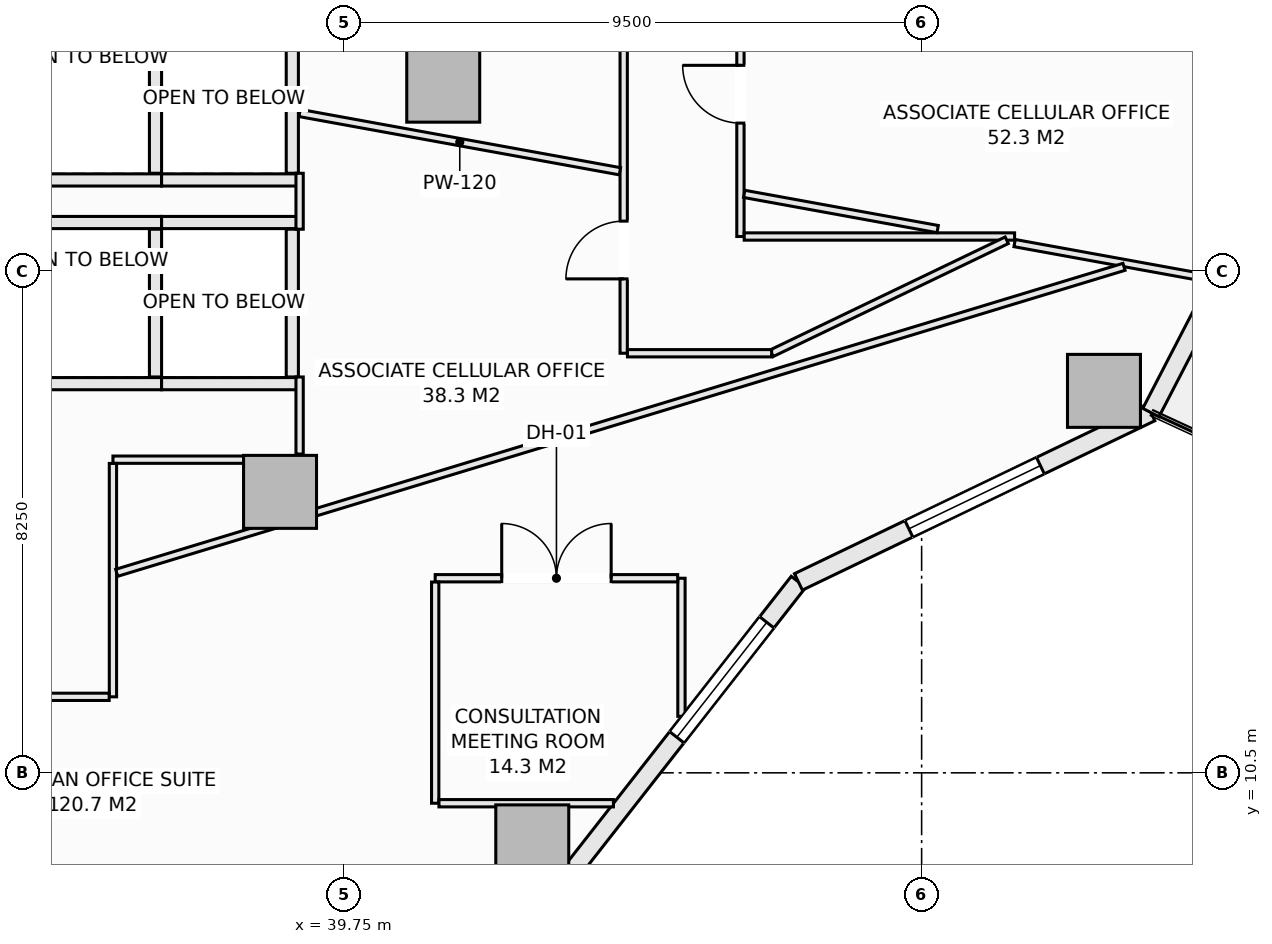
"""IFC4 building model, lengths in metres.
Left out: names, types, materials, properties, quantities, classifications, styles, units other than length and angle.
Written with IfcOpenShell. Run it as: python <this file> out.ifc"""

import sys

from ifc_helpers import new_model, si_unit, direction, frame, frame_2d, origin, origin_2d, place, context, subcontext, project, spatial, rectangle, extrude, element, fill, save


model = new_model("IFC4")
c1 = context("Model", 3, precision=1e-05, world=origin(), true_north=direction((0.0, 1.0)))
c2 = subcontext(c1, "Body", "Model", "MODEL_VIEW")
j1 = project(units=[si_unit("LENGTHUNIT", "METRE"), si_unit("PLANEANGLEUNIT", "RADIAN")], contexts=[c1])
p1 = place(None, origin())
s1 = spatial("IfcSite", under=j1, at=p1, CompositionType="ELEMENT")
p2 = place(p1, origin())
s2 = spatial("IfcBuilding", under=s1, at=p2, CompositionType="ELEMENT")
p3 = place(p2, frame((0.0, 0.0, 65.0)))
s3 = spatial("IfcBuildingStorey", under=s2, at=p3, CompositionType="ELEMENT", Elevation=65.0)
for number, where, z_axis, x_axis in (
    (1, (42.846, 9.373, -0.28), (0.0, 0.0, 1.0), (1.0, 0.0, 0.0)),
    (2, (52.249, 16.781, -0.28), (0.0, 0.0, 1.0), (1.0, 0.0, 0.0)),
    (3, (38.698, 15.121, -0.28), (0.0, 0.0, 1.0), (1.0, 0.0, 0.0)),
    (4, (41.382, 21.801, -0.28), (0.0, 0.0, 1.0), (1.0, 0.0, 0.0)),
):
    element("IfcColumn", number, at=place(p3, frame(where, z_axis=z_axis, x_axis=x_axis)), inside=s3, PredefinedType="COLUMN", context=c2, shape_type="SweptSolid", body=[
        extrude(rectangle(XDim=1.2, YDim=1.2, at=origin_2d()), origin(), (0.0, 0.0, 1.0), 3.85),
    ])
p4 = place(p3, frame((43.344, 8.684, 0.0), z_axis=(0.0, 0.0, 1.0), x_axis=(0.616434798832, 0.78740595552, 0.0)))
e5 = element("IfcWall", 5, at=p4, inside=s3, PredefinedType="SOLIDWALL", context=c2, shape_type="SweptSolid", body=[
    extrude(rectangle(XDim=6.294, YDim=0.3, at=frame_2d((3.147, 0.0))), origin(), (0.0, 0.0, 1.0), 3.093),
])
p5 = place(p4, frame((3.05, 0.0, 0.85)))
e6 = element("IfcOpeningElement", 6, at=p5, cuts=e5, PredefinedType="OPENING", context=c2, shape_type="SweptSolid", body=[
    extrude(rectangle(XDim=2.4, YDim=1.9, at=frame_2d((1.2, 0.95))), frame((0.0, 0.16, 0.0), z_axis=(0.0, -1.0, 0.0), x_axis=(1.0, 0.0, 0.0)), (0.0, 0.0, 1.0), 0.32),
])
p6 = place(p3, frame((47.224, 13.64, 0.0), z_axis=(0.0, 0.0, 1.0), x_axis=(0.901354747727, 0.433081538224, 0.0)))
e7 = element("IfcWall", 7, at=p6, inside=s3, PredefinedType="SOLIDWALL", context=c2, shape_type="SweptSolid", body=[
    extrude(rectangle(XDim=6.431, YDim=0.3, at=frame_2d((3.215, 0.0))), origin(), (0.0, 0.0, 1.0), 3.093),
])
p7 = place(p6, frame((2.015, 0.0, 0.85)))
e8 = element("IfcOpeningElement", 8, at=p7, cuts=e7, PredefinedType="OPENING", context=c2, shape_type="SweptSolid", body=[
    extrude(rectangle(XDim=2.4, YDim=1.9, at=frame_2d((1.2, 0.95))), frame((0.0, 0.16, 0.0), z_axis=(0.0, -1.0, 0.0), x_axis=(1.0, 0.0, 0.0)), (0.0, 0.0, 1.0), 0.32),
])
p8 = place(p3, frame((53.021, 16.425, 0.0), z_axis=(0.0, 0.0, 1.0), x_axis=(0.459800981414, 0.888021991558, 0.0)))
e9 = element("IfcWall", 9, at=p8, inside=s3, PredefinedType="SOLIDWALL", context=c2, shape_type="SweptSolid", body=[
    extrude(rectangle(XDim=5.744, YDim=0.3, at=frame_2d((2.872, 0.0))), origin(), (0.0, 0.0, 1.0), 3.093),
])
p9 = place(p8, frame((2.85, 0.0, 0.85)))
e10 = element("IfcOpeningElement", 10, at=p9, cuts=e9, PredefinedType="OPENING", context=c2, shape_type="SweptSolid", body=[
    extrude(rectangle(XDim=2.4, YDim=1.9, at=frame_2d((1.2, 0.95))), frame((0.0, 0.16, 0.0), z_axis=(0.0, -1.0, 0.0), x_axis=(1.0, 0.0, 0.0)), (0.0, 0.0, 1.0), 0.32),
])
for number, where, z_axis, x_axis in (
    (11, (34.5, 19.55, 0.0), (0.0, 0.0, 1.0), (1.0, 0.0, 0.0)),
    (12, (34.5, 16.9, 0.0), (0.0, 0.0, 1.0), (1.0, 0.0, 0.0)),
):
    element("IfcWall", number, at=place(p3, frame(where, z_axis=z_axis, x_axis=x_axis)), inside=s3, PredefinedType="SOLIDWALL", context=c2, shape_type="SweptSolid", body=[
        extrude(rectangle(XDim=2.25, YDim=0.2, at=frame_2d((1.125, 0.0))), origin(), (0.0, 0.0, 1.0), 3.57),
    ])
p10 = place(p3, frame((36.65, 17.01, 0.0), z_axis=(0.0, 0.0, 1.0), x_axis=(0.0, 1.0, 0.0)))
e13 = element("IfcWall", 13, at=p10, inside=s3, PredefinedType="SOLIDWALL", context=c2, shape_type="SweptSolid", body=[
    extrude(rectangle(XDim=2.43, YDim=0.2, at=frame_2d((1.215, 0.0))), origin(), (0.0, 0.0, 1.0), 3.57),
])
for number, where, z_axis, x_axis in (
    (14, (36.75, 19.55, 0.0), (0.0, 0.0, 1.0), (1.0, 0.0, 0.0)),
    (15, (36.75, 16.9, 0.0), (0.0, 0.0, 1.0), (1.0, 0.0, 0.0)),
):
    element("IfcWall", number, at=place(p3, frame(where, z_axis=z_axis, x_axis=x_axis)), inside=s3, PredefinedType="SOLIDWALL", context=c2, shape_type="SweptSolid", body=[
        extrude(rectangle(XDim=2.25, YDim=0.2, at=frame_2d((1.125, 0.0))), origin(), (0.0, 0.0, 1.0), 3.57),
    ])
p11 = place(p3, frame((38.9, 17.01, 0.0), z_axis=(0.0, 0.0, 1.0), x_axis=(0.0, 1.0, 0.0)))
e16 = element("IfcWall", 16, at=p11, inside=s3, PredefinedType="SOLIDWALL", context=c2, shape_type="SweptSolid", body=[
    extrude(rectangle(XDim=2.43, YDim=0.2, at=frame_2d((1.215, 0.0))), origin(), (0.0, 0.0, 1.0), 3.57),
])
p12 = place(p3, frame((34.5, 20.25, 0.0), z_axis=(0.0, 0.0, 1.0), x_axis=(1.0, 0.0, 0.0)))
e17 = element("IfcWall", 17, at=p12, inside=s3, PredefinedType="SOLIDWALL", context=c2, shape_type="SweptSolid", body=[
    extrude(rectangle(XDim=2.25, YDim=0.2, at=frame_2d((1.125, 0.0))), origin(), (0.0, 0.0, 1.0), 3.57),
])
p13 = place(p3, frame((36.65, 20.36, 0.0), z_axis=(0.0, 0.0, 1.0), x_axis=(0.0, 1.0, 0.0)))
e18 = element("IfcWall", 18, at=p13, inside=s3, PredefinedType="SOLIDWALL", context=c2, shape_type="SweptSolid", body=[
    extrude(rectangle(XDim=2.43, YDim=0.2, at=frame_2d((1.215, 0.0))), origin(), (0.0, 0.0, 1.0), 3.57),
])
p14 = place(p3, frame((36.75, 20.25, 0.0), z_axis=(0.0, 0.0, 1.0), x_axis=(1.0, 0.0, 0.0)))
e19 = element("IfcWall", 19, at=p14, inside=s3, PredefinedType="SOLIDWALL", context=c2, shape_type="SweptSolid", body=[
    extrude(rectangle(XDim=2.25, YDim=0.2, at=frame_2d((1.125, 0.0))), origin(), (0.0, 0.0, 1.0), 3.57),
])
p15 = place(p3, frame((38.9, 20.36, 0.0), z_axis=(0.0, 0.0, 1.0), x_axis=(0.0, 1.0, 0.0)))
e20 = element("IfcWall", 20, at=p15, inside=s3, PredefinedType="SOLIDWALL", context=c2, shape_type="SweptSolid", body=[
    extrude(rectangle(XDim=2.43, YDim=0.2, at=frame_2d((1.215, 0.0))), origin(), (0.0, 0.0, 1.0), 3.57),
])
p16 = place(p3, frame((35.95, 15.65, 0.0), z_axis=(0.0, 0.0, 1.0), x_axis=(1.0, 0.0, 0.0)))
e21 = element("IfcWall", 21, at=p16, inside=s3, PredefinedType="PARTITIONING", context=c2, shape_type="SweptSolid", body=[
    extrude(rectangle(XDim=2.291, YDim=0.12, at=frame_2d((1.146, 0.0))), origin(), (0.0, 0.0, 1.0), 3.57),
])
p17 = place(p3, frame((35.95, 11.75, 0.0), z_axis=(0.0, 0.0, 1.0), x_axis=(0.0, 1.0, 0.0)))
e22 = element("IfcWall", 22, at=p17, inside=s3, PredefinedType="PARTITIONING", context=c2, shape_type="SweptSolid", body=[
    extrude(rectangle(XDim=3.838, YDim=0.12, at=frame_2d((1.919, 0.0))), origin(), (0.0, 0.0, 1.0), 3.57),
])
p18 = place(p3, frame((27.242, 11.75, 0.0), z_axis=(0.0, 0.0, 1.0), x_axis=(1.0, 0.0, 0.0)))
e23 = element("IfcWall", 23, at=p18, inside=s3, PredefinedType="PARTITIONING", context=c2, shape_type="SweptSolid", body=[
    extrude(rectangle(XDim=8.646, YDim=0.12, at=frame_2d((4.323, 0.0))), origin(), (0.0, 0.0, 1.0), 3.57),
])
p19 = place(p18, frame((2.514, 0.0, 0.0)))
e24 = element("IfcOpeningElement", 24, at=p19, cuts=e23, PredefinedType="OPENING", context=c2, shape_type="SweptSolid", body=[
    extrude(rectangle(XDim=0.95, YDim=2.1, at=frame_2d((0.475, 1.05))), frame((0.0, 0.07, 0.0), z_axis=(0.0, -1.0, 0.0), x_axis=(1.0, 0.0, 0.0)), (0.0, 0.0, 1.0), 0.14),
])
p20 = place(p18, frame((6.011, 0.0, 0.0)))
e25 = element("IfcOpeningElement", 25, at=p20, cuts=e23, PredefinedType="OPENING", context=c2, shape_type="SweptSolid", body=[
    extrude(rectangle(XDim=0.95, YDim=2.1, at=frame_2d((0.475, 1.05))), frame((0.0, 0.07, 0.0), z_axis=(0.0, -1.0, 0.0), x_axis=(1.0, 0.0, 0.0)), (0.0, 0.0, 1.0), 0.14),
])
p21 = place(p3, frame((44.35, 17.4, 0.0), z_axis=(0.0, 0.0, 1.0), x_axis=(0.0, 1.0, 0.0)))
e26 = element("IfcWall", 26, at=p21, inside=s3, PredefinedType="PARTITIONING", context=c2, shape_type="SweptSolid", body=[
    extrude(rectangle(XDim=5.62, YDim=0.12, at=frame_2d((2.81, 0.0))), origin(), (0.0, 0.0, 1.0), 3.57),
])
p22 = place(p21, frame((1.223, 0.0, 0.0)))
e27 = element("IfcOpeningElement", 27, at=p22, cuts=e26, PredefinedType="OPENING", context=c2, shape_type="SweptSolid", body=[
    extrude(rectangle(XDim=0.95, YDim=2.1, at=frame_2d((0.475, 1.05))), frame((0.0, 0.07, 0.0), z_axis=(0.0, -1.0, 0.0), x_axis=(1.0, 0.0, 0.0)), (0.0, 0.0, 1.0), 0.14),
])
p23 = place(p3, frame((46.27, 19.32, 0.0), z_axis=(0.0, 0.0, 1.0), x_axis=(0.0, 1.0, 0.0)))
e28 = element("IfcWall", 28, at=p23, inside=s3, PredefinedType="PARTITIONING", context=c2, shape_type="SweptSolid", body=[
    extrude(rectangle(XDim=14.798, YDim=0.12, at=frame_2d((7.399, 0.0))), origin(), (0.0, 0.0, 1.0), 3.57),
])
p24 = place(p23, frame((1.865, 0.0, 0.0)))
e29 = element("IfcOpeningElement", 29, at=p24, cuts=e28, PredefinedType="OPENING", context=c2, shape_type="SweptSolid", body=[
    extrude(rectangle(XDim=0.95, YDim=2.1, at=frame_2d((0.475, 1.05))), frame((0.0, 0.07, 0.0), z_axis=(0.0, -1.0, 0.0), x_axis=(1.0, 0.0, 0.0)), (0.0, 0.0, 1.0), 0.14),
])
p25 = place(p23, frame((5.818, 0.0, 0.0)))
e30 = element("IfcOpeningElement", 30, at=p25, cuts=e28, PredefinedType="OPENING", context=c2, shape_type="SweptSolid", body=[
    extrude(rectangle(XDim=0.95, YDim=2.1, at=frame_2d((0.475, 1.05))), frame((0.0, 0.07, 0.0), z_axis=(0.0, -1.0, 0.0), x_axis=(1.0, 0.0, 0.0)), (0.0, 0.0, 1.0), 0.14),
])
p26 = place(p23, frame((10.871, 0.0, 0.0)))
e31 = element("IfcOpeningElement", 31, at=p26, cuts=e28, PredefinedType="OPENING", context=c2, shape_type="SweptSolid", body=[
    extrude(rectangle(XDim=0.95, YDim=2.1, at=frame_2d((0.475, 1.05))), frame((0.0, 0.07, 0.0), z_axis=(0.0, -1.0, 0.0), x_axis=(1.0, 0.0, 0.0)), (0.0, 0.0, 1.0), 0.14),
])
p27 = place(p3, frame((46.332, 19.32, 0.0), z_axis=(0.0, 0.0, 1.0), x_axis=(1.0, 0.0, 0.0)))
e32 = element("IfcWall", 32, at=p27, inside=s3, PredefinedType="PARTITIONING", context=c2, shape_type="SweptSolid", body=[
    extrude(rectangle(XDim=4.447, YDim=0.12, at=frame_2d((2.224, 0.0))), origin(), (0.0, 0.0, 1.0), 3.205),
])
p28 = place(p3, frame((46.783, 17.4, 0.0), z_axis=(0.0, 0.0, 1.0), x_axis=(0.901339159108, 0.433113980679, 0.0)))
e33 = element("IfcWall", 33, at=p28, inside=s3, PredefinedType="PARTITIONING", context=c2, shape_type="SweptSolid", body=[
    extrude(rectangle(XDim=4.29, YDim=0.12, at=frame_2d((2.145, 0.0))), origin(), (0.0, 0.0, 1.0), 3.57),
])
p29 = place(p3, frame((44.412, 17.4, 0.0), z_axis=(0.0, 0.0, 1.0), x_axis=(1.0, 0.0, 0.0)))
e34 = element("IfcWall", 34, at=p29, inside=s3, PredefinedType="PARTITIONING", context=c2, shape_type="SweptSolid", body=[
    extrude(rectangle(XDim=2.371, YDim=0.12, at=frame_2d((1.186, 0.0))), origin(), (0.0, 0.0, 1.0), 3.57),
])
p30 = place(p3, frame((39.02, 15.742, 0.0), z_axis=(0.0, 0.0, 1.0), x_axis=(0.0, 1.0, 0.0)))
e35 = element("IfcWall", 35, at=p30, inside=s3, PredefinedType="PARTITIONING", context=c2, shape_type="SweptSolid", body=[
    extrude(rectangle(XDim=1.268, YDim=0.12, at=frame_2d((0.634, 0.0))), origin(), (0.0, 0.0, 1.0), 2.934),
])
p31 = place(p3, frame((39.02, 19.44, 0.0), z_axis=(0.0, 0.0, 1.0), x_axis=(0.0, 1.0, 0.0)))
e36 = element("IfcWall", 36, at=p31, inside=s3, PredefinedType="PARTITIONING", context=c2, shape_type="SweptSolid", body=[
    extrude(rectangle(XDim=0.92, YDim=0.12, at=frame_2d((0.46, 0.0))), origin(), (0.0, 0.0, 1.0), 3.57),
])
p32 = place(p3, frame((39.02, 21.351, 0.0), z_axis=(0.0, 0.0, 1.0), x_axis=(0.983848017156, -0.179005807552, 0.0)))
e37 = element("IfcWall", 37, at=p32, inside=s3, PredefinedType="PARTITIONING", context=c2, shape_type="SweptSolid", body=[
    extrude(rectangle(XDim=5.354, YDim=0.12, at=frame_2d((2.677, 0.0))), origin(), (0.0, 0.0, 1.0), 3.205),
])
p33 = place(p3, frame((46.332, 20.021, 0.0), z_axis=(0.0, 0.0, 1.0), x_axis=(0.983836071263, -0.17907145189, 0.0)))
e38 = element("IfcWall", 38, at=p33, inside=s3, PredefinedType="PARTITIONING", context=c2, shape_type="SweptSolid", body=[
    extrude(rectangle(XDim=3.234, YDim=0.12, at=frame_2d((1.617, 0.0))), origin(), (0.0, 0.0, 1.0), 3.57),
])
p34 = place(p3, frame((50.779, 19.212, 0.0), z_axis=(0.0, 0.0, 1.0), x_axis=(0.983831584621, -0.179096100189, 0.0)))
e39 = element("IfcWall", 39, at=p34, inside=s3, PredefinedType="PARTITIONING", context=c2, shape_type="SweptSolid", body=[
    extrude(rectangle(XDim=3.263, YDim=0.12, at=frame_2d((1.632, 0.0))), origin(), (0.0, 0.0, 1.0), 3.57),
])
p35 = place(p3, frame((36.012, 13.79, 0.0), z_axis=(0.0, 0.0, 1.0), x_axis=(0.95683920317, 0.290617857809, 0.0)))
e40 = element("IfcWall", 40, at=p35, inside=s3, PredefinedType="PARTITIONING", context=c2, shape_type="SweptSolid", body=[
    extrude(rectangle(XDim=17.314, YDim=0.12, at=frame_2d((8.657, 0.0))), origin(), (0.0, 0.0, 1.0), 3.57),
])
p36 = place(p3, frame((45.3, 11.429, 0.0), z_axis=(0.0, 0.0, 1.0), x_axis=(0.0, 1.0, 0.0)))
e41 = element("IfcWall", 41, at=p36, inside=s3, PredefinedType="PARTITIONING", context=c2, shape_type="SweptSolid", body=[
    extrude(rectangle(XDim=2.271, YDim=0.12, at=frame_2d((1.135, 0.0))), origin(), (0.0, 0.0, 1.0), 3.57),
])
p37 = place(p3, frame((41.25, 13.7, 0.0), z_axis=(0.0, 0.0, 1.0), x_axis=(1.0, 0.0, 0.0)))
e42 = element("IfcWall", 42, at=p37, inside=s3, PredefinedType="PARTITIONING", context=c2, shape_type="SweptSolid", body=[
    extrude(rectangle(XDim=3.988, YDim=0.12, at=frame_2d((1.994, 0.0))), origin(), (0.0, 0.0, 1.0), 3.57),
])
p38 = place(p37, frame((1.094, 0.0, 0.0)))
e43 = element("IfcOpeningElement", 43, at=p38, cuts=e42, PredefinedType="OPENING", context=c2, shape_type="SweptSolid", body=[
    extrude(rectangle(XDim=1.8, YDim=2.3, at=frame_2d((0.9, 1.15))), frame((0.0, 0.07, 0.0), z_axis=(0.0, -1.0, 0.0), x_axis=(1.0, 0.0, 0.0)), (0.0, 0.0, 1.0), 0.14),
])
p39 = place(p3, frame((41.25, 10.0, 0.0), z_axis=(0.0, 0.0, 1.0), x_axis=(0.0, 1.0, 0.0)))
e44 = element("IfcWall", 44, at=p39, inside=s3, PredefinedType="PARTITIONING", context=c2, shape_type="SweptSolid", body=[
    extrude(rectangle(XDim=3.638, YDim=0.12, at=frame_2d((1.819, 0.0))), origin(), (0.0, 0.0, 1.0), 2.934),
])
p40 = place(p3, frame((41.312, 10.0, 0.0), z_axis=(0.0, 0.0, 1.0), x_axis=(1.0, 0.0, 0.0)))
e45 = element("IfcWall", 45, at=p40, inside=s3, PredefinedType="PARTITIONING", context=c2, shape_type="SweptSolid", body=[
    extrude(rectangle(XDim=2.869, YDim=0.12, at=frame_2d((1.435, 0.0))), origin(), (0.0, 0.0, 1.0), 3.093),
])
p41 = place(p5, origin())
e46 = element("IfcWindow", 46, at=p41, inside=s3, PartitioningType="SINGLE_PANEL", PredefinedType="WINDOW", context=c2, shape_type="SweptSolid", body=[
    extrude(rectangle(XDim=2.4, YDim=1.9, at=frame_2d((1.2, 0.95))), frame((0.0, 0.03, 0.0), z_axis=(0.0, -1.0, 0.0), x_axis=(1.0, 0.0, 0.0)), (0.0, 0.0, 1.0), 0.06),
])
fill(e6, e46)
p42 = place(p7, origin())
e47 = element("IfcWindow", 47, at=p42, inside=s3, PartitioningType="SINGLE_PANEL", PredefinedType="WINDOW", context=c2, shape_type="SweptSolid", body=[
    extrude(rectangle(XDim=2.4, YDim=1.9, at=frame_2d((1.2, 0.95))), frame((0.0, 0.03, 0.0), z_axis=(0.0, -1.0, 0.0), x_axis=(1.0, 0.0, 0.0)), (0.0, 0.0, 1.0), 0.06),
])
fill(e8, e47)
p43 = place(p22, origin())
e48 = element("IfcDoor", 48, at=p43, inside=s3, OperationType="SINGLE_SWING_LEFT", PredefinedType="DOOR", context=c2, shape_type="SweptSolid", body=[
    extrude(rectangle(XDim=0.95, YDim=2.1, at=frame_2d((0.475, 1.05))), frame((0.0, 0.025, 0.0), z_axis=(0.0, -1.0, 0.0), x_axis=(1.0, 0.0, 0.0)), (0.0, 0.0, 1.0), 0.05),
])
fill(e27, e48)
p44 = place(p24, origin())
e49 = element("IfcDoor", 49, at=p44, inside=s3, OperationType="SINGLE_SWING_RIGHT", PredefinedType="DOOR", context=c2, shape_type="SweptSolid", body=[
    extrude(rectangle(XDim=0.95, YDim=2.1, at=frame_2d((0.475, 1.05))), frame((0.0, 0.025, 0.0), z_axis=(0.0, -1.0, 0.0), x_axis=(1.0, 0.0, 0.0)), (0.0, 0.0, 1.0), 0.05),
])
fill(e29, e49)
p45 = place(p38, origin())
e50 = element("IfcDoor", 50, at=p45, inside=s3, OperationType="DOUBLE_DOOR_SINGLE_SWING", PredefinedType="DOOR", context=c2, shape_type="SweptSolid", body=[
    extrude(rectangle(XDim=1.8, YDim=2.3, at=frame_2d((0.9, 1.15))), frame((0.0, 0.025, 0.0), z_axis=(0.0, -1.0, 0.0), x_axis=(1.0, 0.0, 0.0)), (0.0, 0.0, 1.0), 0.05),
])
fill(e43, e50)
save(model, sys.argv[1])
